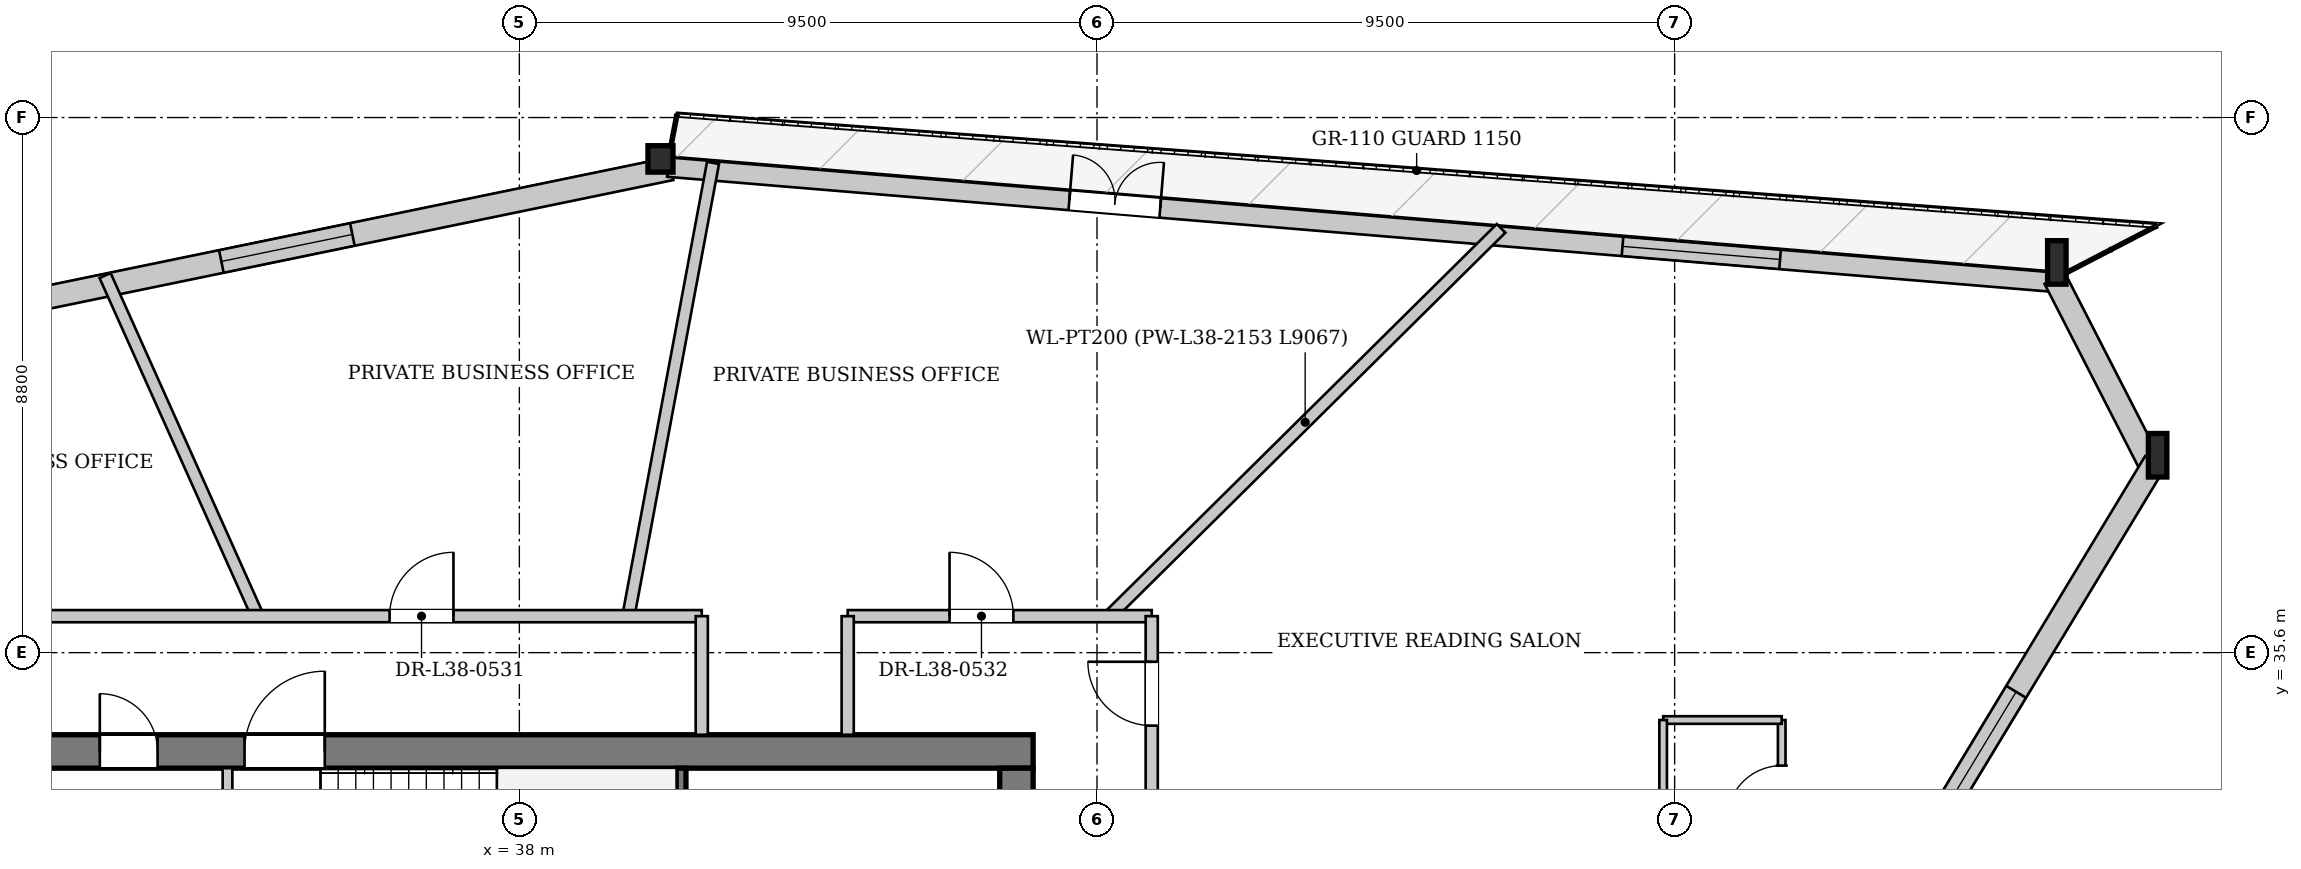
"""IFC4 building model, lengths in metres.
Left out: names, types, materials, properties, quantities, classifications, styles, units other than length and angle.
Written with IfcOpenShell. Run it as: python <this file> out.ifc"""

import sys

from ifc_helpers import new_model, si_unit, direction, frame, frame_2d, origin, origin_2d, place, context, subcontext, project, spatial, rectangle, i_section, extrude, source, transform, mapped, element, fill, save


model = new_model("IFC4")
c1 = context("Model", 3, precision=1e-05, world=origin(), true_north=direction((0.0, 1.0)))
c2 = subcontext(c1, "Body", "Model", "MODEL_VIEW")
j1 = project(units=[si_unit("LENGTHUNIT", "METRE"), si_unit("PLANEANGLEUNIT", "RADIAN")], contexts=[c1])
p1 = place(None, origin())
s1 = spatial("IfcSite", under=j1, at=p1, CompositionType="ELEMENT")
p2 = place(p1, origin())
s2 = spatial("IfcBuilding", under=s1, at=p2, CompositionType="ELEMENT")
p3 = place(p2, frame((0.0, 0.0, 146.6)))
s3 = spatial("IfcBuildingStorey", under=s2, at=p3, CompositionType="ELEMENT", Elevation=146.6)
m1 = source(origin(), c2, "Body", "SweptSolid", [
    extrude(i_section(OverallWidth=0.304, OverallDepth=0.716, WebThickness=0.021, FlangeThickness=0.04, at=origin_2d()), origin(), (0.0, 0.0, 1.0), 3.419),
])
p4 = place(p3, frame((65.063, 38.637, 0.0), z_axis=(-0.070258016221, 0.122594526272, 0.989966864741), x_axis=(-0.867620537636, -0.497226912658, 0.0)))
e1 = element("IfcColumn", 1, at=p4, inside=s3, PredefinedType="COLUMN", context=c2, shape_type="MappedRepresentation", body=[
    mapped(m1, transform((0.0, 0.0, 0.0), x_axis=(1.0, 0.0, 0.0), y_axis=(0.0, 1.0, 0.0), z_axis=(0.0, 0.0, 1.0), scale=1.0)),
])
m2 = source(origin(), c2, "Body", "SweptSolid", [
    extrude(i_section(OverallWidth=0.304, OverallDepth=0.716, WebThickness=0.021, FlangeThickness=0.04, at=origin_2d()), origin(), (0.0, 0.0, 1.0), 3.415),
])
p5 = place(p3, frame((63.422, 41.837, 0.0), z_axis=(-0.079785459835, 0.105236735552, 0.991241398394), x_axis=(-0.796871005575, -0.604149485205, 0.0)))
e2 = element("IfcColumn", 2, at=p5, inside=s3, PredefinedType="COLUMN", context=c2, shape_type="MappedRepresentation", body=[
    mapped(m2, transform((0.0, 0.0, 0.0), x_axis=(1.0, 0.0, 0.0), y_axis=(0.0, 1.0, 0.0), z_axis=(0.0, 0.0, 1.0), scale=1.0)),
])
m3 = source(origin(), c2, "Body", "SweptSolid", [
    extrude(i_section(OverallWidth=0.412, OverallDepth=0.435, WebThickness=0.031, FlangeThickness=0.05, at=origin_2d()), origin(), (0.0, 0.0, 1.0), 3.396),
])
p6 = place(p3, frame((40.457, 43.744, 0.0), z_axis=(-0.080079410056, -0.01473633668, 0.996679551544), x_axis=(0.180982664864, -0.983486286137, 0.0)))
e3 = element("IfcColumn", 3, at=p6, inside=s3, PredefinedType="COLUMN", context=c2, shape_type="MappedRepresentation", body=[
    mapped(m3, transform((0.0, 0.0, 0.0), x_axis=(1.0, 0.0, 0.0), y_axis=(0.0, 1.0, 0.0), z_axis=(0.0, 0.0, 1.0), scale=1.0)),
])
p7 = place(p3, frame((17.926, 38.903, 0.0), z_axis=(0.0, 0.0, 1.0), x_axis=(0.979384542026, 0.202004749552, 0.0)))
e4 = element("IfcWall", 4, at=p7, inside=s3, PredefinedType="SOLIDWALL", context=c2, shape_type="SweptSolid", body=[
    extrude(rectangle(XDim=23.044, YDim=0.38, at=frame_2d((11.522, 0.0))), origin(), (0.0, 0.0, 1.0), 2.692),
])
p8 = place(p7, frame((5.352, 0.0, 0.322)))
e5 = element("IfcOpeningElement", 5, at=p8, cuts=e4, PredefinedType="OPENING", context=c2, shape_type="SweptSolid", body=[
    extrude(rectangle(XDim=2.2, YDim=2.25, at=frame_2d((1.1, 1.125))), frame((0.0, 0.2, 0.0), z_axis=(0.0, -1.0, 0.0), x_axis=(1.0, 0.0, 0.0)), (0.0, 0.0, 1.0), 0.4),
])
p9 = place(p7, frame((15.492, 0.0, 0.322)))
e6 = element("IfcOpeningElement", 6, at=p9, cuts=e4, PredefinedType="OPENING", context=c2, shape_type="SweptSolid", body=[
    extrude(rectangle(XDim=2.2, YDim=2.25, at=frame_2d((1.1, 1.125))), frame((0.0, 0.2, 0.0), z_axis=(0.0, -1.0, 0.0), x_axis=(1.0, 0.0, 0.0)), (0.0, 0.0, 1.0), 0.4),
])
p10 = place(p3, frame((40.444, 43.585, 0.0), z_axis=(0.0, 0.0, 1.0), x_axis=(0.996570046252, -0.08275350695, 0.0)))
e7 = element("IfcWall", 7, at=p10, inside=s3, PredefinedType="SOLIDWALL", context=c2, shape_type="SweptSolid", body=[
    extrude(rectangle(XDim=23.044, YDim=0.32, at=frame_2d((11.522, 0.0))), origin(), (0.0, 0.0, 1.0), 2.692),
])
p11 = place(p10, frame((6.624, 0.0, 0.0)))
e8 = element("IfcOpeningElement", 8, at=p11, cuts=e7, PredefinedType="OPENING", context=c2, shape_type="SweptSolid", body=[
    extrude(rectangle(XDim=1.5, YDim=2.3, at=frame_2d((0.75, 1.15))), frame((0.0, 0.17, 0.0), z_axis=(0.0, -1.0, 0.0), x_axis=(1.0, 0.0, 0.0)), (0.0, 0.0, 1.0), 0.34),
])
p12 = place(p10, frame((15.753, 0.0, 0.25)))
e9 = element("IfcOpeningElement", 9, at=p12, cuts=e7, PredefinedType="OPENING", context=c2, shape_type="SweptSolid", body=[
    extrude(rectangle(XDim=2.6, YDim=2.35, at=frame_2d((1.3, 1.175))), frame((0.0, 0.17, 0.0), z_axis=(0.0, -1.0, 0.0), x_axis=(1.0, 0.0, 0.0)), (0.0, 0.0, 1.0), 0.34),
])
p13 = place(p3, frame((63.253, 41.751, 0.0), z_axis=(0.0, 0.0, 1.0), x_axis=(0.456338692797, -0.889806157237, 0.0)))
e10 = element("IfcWall", 10, at=p13, inside=s3, PredefinedType="SOLIDWALL", context=c2, shape_type="SweptSolid", body=[
    extrude(rectangle(XDim=3.597, YDim=0.38, at=frame_2d((1.799, 0.0))), origin(), (0.0, 0.0, 1.0), 2.692),
])
p14 = place(p3, frame((64.901, 38.735, 0.0), z_axis=(0.0, 0.0, 1.0), x_axis=(-0.517346318523, -0.855776131188, 0.0)))
e11 = element("IfcWall", 11, at=p14, inside=s3, PredefinedType="SOLIDWALL", context=c2, shape_type="SweptSolid", body=[
    extrude(rectangle(XDim=23.63, YDim=0.38, at=frame_2d((11.815, 0.0))), origin(), (0.0, 0.0, 1.0), 2.692),
])
p15 = place(p14, frame((4.416, 0.0, 0.322)))
e12 = element("IfcOpeningElement", 12, at=p15, cuts=e11, PredefinedType="OPENING", context=c2, shape_type="SweptSolid", body=[
    extrude(rectangle(XDim=2.2, YDim=2.25, at=frame_2d((1.1, 1.125))), frame((0.0, 0.2, 0.0), z_axis=(0.0, -1.0, 0.0), x_axis=(1.0, 0.0, 0.0)), (0.0, 0.0, 1.0), 0.4),
])
p16 = place(p14, frame((15.914, 0.0, 0.322)))
e13 = element("IfcOpeningElement", 13, at=p16, cuts=e11, PredefinedType="OPENING", context=c2, shape_type="SweptSolid", body=[
    extrude(rectangle(XDim=2.2, YDim=2.25, at=frame_2d((1.1, 1.125))), frame((0.0, 0.2, 0.0), z_axis=(0.0, -1.0, 0.0), x_axis=(1.0, 0.0, 0.0)), (0.0, 0.0, 1.0), 0.4),
])
p17 = place(p3, frame((29.55, 33.975, 0.0), z_axis=(0.0, 0.0, 1.0), x_axis=(1.0, 0.0, 0.0)))
e14 = element("IfcWall", 14, at=p17, inside=s3, PredefinedType="SHEAR", context=c2, shape_type="SweptSolid", body=[
    extrude(rectangle(XDim=16.9, YDim=0.55, at=frame_2d((8.45, 0.0))), origin(), (0.0, 0.0, 1.0), 3.3),
])
p18 = place(p17, frame((1.55, 0.0, 0.0)))
e15 = element("IfcOpeningElement", 15, at=p18, cuts=e14, PredefinedType="OPENING", context=c2, shape_type="SweptSolid", body=[
    extrude(rectangle(XDim=0.95, YDim=2.1, at=frame_2d((0.475, 1.05))), frame((0.0, 0.285, 0.0), z_axis=(0.0, -1.0, 0.0), x_axis=(1.0, 0.0, 0.0)), (0.0, 0.0, 1.0), 0.57),
])
p19 = place(p17, frame((3.93, 0.0, 0.0)))
e16 = element("IfcOpeningElement", 16, at=p19, cuts=e14, PredefinedType="OPENING", context=c2, shape_type="SweptSolid", body=[
    extrude(rectangle(XDim=1.32, YDim=2.2, at=frame_2d((0.66, 1.1))), frame((0.0, 0.285, 0.0), z_axis=(0.0, -1.0, 0.0), x_axis=(1.0, 0.0, 0.0)), (0.0, 0.0, 1.0), 0.57),
])
p20 = place(p3, frame((46.175, 33.7, 0.0), z_axis=(0.0, 0.0, 1.0), x_axis=(0.0, -1.0, 0.0)))
e17 = element("IfcWall", 17, at=p20, inside=s3, PredefinedType="SHEAR", context=c2, shape_type="SweptSolid", body=[
    extrude(rectangle(XDim=14.2, YDim=0.55, at=frame_2d((7.1, 0.0))), origin(), (0.0, 0.0, 1.0), 3.3),
])
p21 = place(p20, frame((5.18, 0.0, 0.0)))
e18 = element("IfcOpeningElement", 18, at=p21, cuts=e17, PredefinedType="OPENING", context=c2, shape_type="SweptSolid", body=[
    extrude(rectangle(XDim=1.6, YDim=2.2, at=frame_2d((0.8, 1.1))), frame((0.0, 0.285, 0.0), z_axis=(0.0, -1.0, 0.0), x_axis=(1.0, 0.0, 0.0)), (0.0, 0.0, 1.0), 0.57),
])
p22 = place(p20, frame((2.05, 0.0, 0.0)))
e19 = element("IfcOpeningElement", 19, at=p22, cuts=e17, PredefinedType="OPENING", context=c2, shape_type="SweptSolid", body=[
    extrude(rectangle(XDim=0.95, YDim=2.1, at=frame_2d((0.475, 1.05))), frame((0.0, 0.285, 0.0), z_axis=(0.0, -1.0, 0.0), x_axis=(1.0, 0.0, 0.0)), (0.0, 0.0, 1.0), 0.57),
])
p23 = place(p3, frame((40.66, 30.6, 0.0), z_axis=(0.0, 0.0, 1.0), x_axis=(0.0, 1.0, 0.0)))
e20 = element("IfcWall", 20, at=p23, inside=s3, PredefinedType="PARTITIONING", context=c2, shape_type="SweptSolid", body=[
    extrude(rectangle(XDim=3.1, YDim=0.16, at=frame_2d((1.55, 0.0))), origin(), (0.0, 0.0, 1.0), 3.3),
])
p24 = place(p3, frame((33.2, 28.44, 0.0), z_axis=(0.0, 0.0, 1.0), x_axis=(0.0, 1.0, 0.0)))
e21 = element("IfcWall", 21, at=p24, inside=s3, PredefinedType="PARTITIONING", context=c2, shape_type="SweptSolid", body=[
    extrude(rectangle(XDim=5.26, YDim=0.16, at=frame_2d((2.63, 0.0))), origin(), (0.0, 0.0, 1.0), 3.3),
])
p25 = place(p3, frame((47.701, 36.2, 0.0), z_axis=(0.0, 0.0, 1.0), x_axis=(0.710799449418, 0.703394727523, 0.0)))
e22 = element("IfcWall", 22, at=p25, inside=s3, PredefinedType="PARTITIONING", context=c2, shape_type="SweptSolid", body=[
    extrude(rectangle(XDim=9.067, YDim=0.2, at=frame_2d((4.533, 0.0))), origin(), (0.0, 0.0, 1.0), 3.3),
])
p26 = place(p3, frame((39.793, 36.2, 0.0), z_axis=(0.0, 0.0, 1.0), x_axis=(0.183586717178, 0.983003518445, 0.0)))
e23 = element("IfcWall", 23, at=p26, inside=s3, PredefinedType="PARTITIONING", context=c2, shape_type="SweptSolid", body=[
    extrude(rectangle(XDim=7.583, YDim=0.2, at=frame_2d((3.792, 0.0))), origin(), (0.0, 0.0, 1.0), 3.3),
])
p27 = place(p3, frame((33.697, 36.2, 0.0), z_axis=(0.0, 0.0, 1.0), x_axis=(-0.408999948969, 0.912534405786, 0.0)))
e24 = element("IfcWall", 24, at=p27, inside=s3, PredefinedType="PARTITIONING", context=c2, shape_type="SweptSolid", body=[
    extrude(rectangle(XDim=6.139, YDim=0.2, at=frame_2d((3.069, 0.0))), origin(), (0.0, 0.0, 1.0), 3.3),
])
p28 = place(p3, frame((58.761, 32.092, 0.0), z_axis=(0.0, 0.0, 1.0), x_axis=(0.0, 1.0, 0.0)))
e25 = element("IfcWall", 25, at=p28, inside=s3, PredefinedType="PARTITIONING", context=c2, shape_type="SweptSolid", body=[
    extrude(rectangle(XDim=2.4, YDim=0.125, at=frame_2d((1.2, 0.0))), origin(), (0.0, 0.0, 1.0), 3.3),
])
p29 = place(p28, frame((0.75, 0.0, 0.0)))
e26 = element("IfcOpeningElement", 26, at=p29, cuts=e25, PredefinedType="OPENING", context=c2, shape_type="SweptSolid", body=[
    extrude(rectangle(XDim=0.9, YDim=2.1, at=frame_2d((0.45, 1.05))), frame((0.0, 0.073, 0.0), z_axis=(0.0, -1.0, 0.0), x_axis=(1.0, 0.0, 0.0)), (0.0, 0.0, 1.0), 0.145),
])
p30 = place(p3, frame((58.761, 34.492, 0.0), z_axis=(0.0, 0.0, 1.0), x_axis=(-1.0, 0.0, 0.0)))
e27 = element("IfcWall", 27, at=p30, inside=s3, PredefinedType="PARTITIONING", context=c2, shape_type="SweptSolid", body=[
    extrude(rectangle(XDim=1.95, YDim=0.125, at=frame_2d((0.975, 0.0))), origin(), (0.0, 0.0, 1.0), 3.3),
])
p31 = place(p3, frame((56.811, 34.492, 0.0), z_axis=(0.0, 0.0, 1.0), x_axis=(0.0, -1.0, 0.0)))
e28 = element("IfcWall", 28, at=p31, inside=s3, PredefinedType="PARTITIONING", context=c2, shape_type="SweptSolid", body=[
    extrude(rectangle(XDim=2.4, YDim=0.125, at=frame_2d((1.2, 0.0))), origin(), (0.0, 0.0, 1.0), 3.3),
])
p32 = place(p3, frame((27.6, 36.2, 0.0), z_axis=(0.0, 0.0, 1.0), x_axis=(1.0, 0.0, 0.0)))
e29 = element("IfcWall", 29, at=p32, inside=s3, PredefinedType="PARTITIONING", context=c2, shape_type="SweptSolid", body=[
    extrude(rectangle(XDim=13.4, YDim=0.2, at=frame_2d((6.7, 0.0))), origin(), (0.0, 0.0, 1.0), 3.3),
])
p33 = place(p32, frame((8.266, 0.0, 0.0)))
e30 = element("IfcOpeningElement", 30, at=p33, cuts=e29, PredefinedType="OPENING", context=c2, shape_type="SweptSolid", body=[
    extrude(rectangle(XDim=1.05, YDim=2.2, at=frame_2d((0.525, 1.1))), frame((0.0, 0.11, 0.0), z_axis=(0.0, -1.0, 0.0), x_axis=(1.0, 0.0, 0.0)), (0.0, 0.0, 1.0), 0.22),
])
p34 = place(p3, frame((41.0, 34.25, 0.0), z_axis=(0.0, 0.0, 1.0), x_axis=(0.0, 1.0, 0.0)))
e31 = element("IfcWall", 31, at=p34, inside=s3, PredefinedType="PARTITIONING", context=c2, shape_type="SweptSolid", body=[
    extrude(rectangle(XDim=1.95, YDim=0.2, at=frame_2d((0.975, 0.0))), origin(), (0.0, 0.0, 1.0), 3.3),
])
p35 = place(p3, frame((43.4, 36.2, 0.0), z_axis=(0.0, 0.0, 1.0), x_axis=(1.0, 0.0, 0.0)))
e32 = element("IfcWall", 32, at=p35, inside=s3, PredefinedType="PARTITIONING", context=c2, shape_type="SweptSolid", body=[
    extrude(rectangle(XDim=5.0, YDim=0.2, at=frame_2d((2.5, 0.0))), origin(), (0.0, 0.0, 1.0), 3.3),
])
p36 = place(p35, frame((1.675, 0.0, 0.0)))
e33 = element("IfcOpeningElement", 33, at=p36, cuts=e32, PredefinedType="OPENING", context=c2, shape_type="SweptSolid", body=[
    extrude(rectangle(XDim=1.05, YDim=2.2, at=frame_2d((0.525, 1.1))), frame((0.0, 0.11, 0.0), z_axis=(0.0, -1.0, 0.0), x_axis=(1.0, 0.0, 0.0)), (0.0, 0.0, 1.0), 0.22),
])
p37 = place(p3, frame((43.4, 34.25, 0.0), z_axis=(0.0, 0.0, 1.0), x_axis=(0.0, 1.0, 0.0)))
e34 = element("IfcWall", 34, at=p37, inside=s3, PredefinedType="PARTITIONING", context=c2, shape_type="SweptSolid", body=[
    extrude(rectangle(XDim=1.95, YDim=0.2, at=frame_2d((0.975, 0.0))), origin(), (0.0, 0.0, 1.0), 3.3),
])
p38 = place(p3, frame((48.4, 17.0, 0.0), z_axis=(0.0, 0.0, 1.0), x_axis=(0.0, 1.0, 0.0)))
e35 = element("IfcWall", 35, at=p38, inside=s3, PredefinedType="PARTITIONING", context=c2, shape_type="SweptSolid", body=[
    extrude(rectangle(XDim=19.2, YDim=0.2, at=frame_2d((9.6, 0.0))), origin(), (0.0, 0.0, 1.0), 3.3),
])
p39 = place(p38, frame((6.726, 0.0, 0.0)))
e36 = element("IfcOpeningElement", 36, at=p39, cuts=e35, PredefinedType="OPENING", context=c2, shape_type="SweptSolid", body=[
    extrude(rectangle(XDim=1.05, YDim=2.2, at=frame_2d((0.525, 1.1))), frame((0.0, 0.11, 0.0), z_axis=(0.0, -1.0, 0.0), x_axis=(1.0, 0.0, 0.0)), (0.0, 0.0, 1.0), 0.22),
])
p40 = place(p38, frame((17.4, 0.0, 0.0)))
e37 = element("IfcOpeningElement", 37, at=p40, cuts=e35, PredefinedType="OPENING", context=c2, shape_type="SweptSolid", body=[
    extrude(rectangle(XDim=1.05, YDim=2.2, at=frame_2d((0.525, 1.1))), frame((0.0, 0.11, 0.0), z_axis=(0.0, -1.0, 0.0), x_axis=(1.0, 0.0, 0.0)), (0.0, 0.0, 1.0), 0.22),
])
m4 = source(origin(), c2, "Body", "SweptSolid", [
    extrude(rectangle(XDim=2.2, YDim=2.25, at=frame_2d((1.1, 1.125))), frame((0.0, 0.03, 0.0), z_axis=(0.0, -1.0, 0.0), x_axis=(1.0, 0.0, 0.0)), (0.0, 0.0, 1.0), 0.06),
])
p41 = place(p9, origin())
e38 = element("IfcWindow", 38, at=p41, inside=s3, PartitioningType="SINGLE_PANEL", PredefinedType="WINDOW", context=c2, shape_type="MappedRepresentation", body=[
    mapped(m4, transform((0.0, 0.0, 0.0), x_axis=(1.0, 0.0, 0.0), y_axis=(0.0, 1.0, 0.0), z_axis=(0.0, 0.0, 1.0), scale=1.0)),
])
fill(e6, e38)
m5 = source(origin(), c2, "Body", "SweptSolid", [
    extrude(rectangle(XDim=1.5, YDim=2.3, at=frame_2d((0.75, 1.15))), frame((0.0, 0.025, 0.0), z_axis=(0.0, -1.0, 0.0), x_axis=(1.0, 0.0, 0.0)), (0.0, 0.0, 1.0), 0.05),
])
p42 = place(p11, origin())
e39 = element("IfcDoor", 39, at=p42, inside=s3, OperationType="DOUBLE_DOOR_SINGLE_SWING", PredefinedType="DOOR", context=c2, shape_type="MappedRepresentation", body=[
    mapped(m5, transform((0.0, 0.0, 0.0), x_axis=(1.0, 0.0, 0.0), y_axis=(0.0, 1.0, 0.0), z_axis=(0.0, 0.0, 1.0), scale=1.0)),
])
fill(e8, e39)
m6 = source(origin(), c2, "Body", "SweptSolid", [
    extrude(rectangle(XDim=2.6, YDim=2.35, at=frame_2d((1.3, 1.175))), frame((0.0, 0.03, 0.0), z_axis=(0.0, -1.0, 0.0), x_axis=(1.0, 0.0, 0.0)), (0.0, 0.0, 1.0), 0.06),
])
p43 = place(p12, origin())
e40 = element("IfcWindow", 40, at=p43, inside=s3, PartitioningType="SINGLE_PANEL", PredefinedType="WINDOW", context=c2, shape_type="MappedRepresentation", body=[
    mapped(m6, transform((0.0, 0.0, 0.0), x_axis=(1.0, 0.0, 0.0), y_axis=(0.0, 1.0, 0.0), z_axis=(0.0, 0.0, 1.0), scale=1.0)),
])
fill(e9, e40)
p44 = place(p15, origin())
e41 = element("IfcWindow", 41, at=p44, inside=s3, PartitioningType="SINGLE_PANEL", PredefinedType="WINDOW", context=c2, shape_type="MappedRepresentation", body=[
    mapped(m4, transform((0.0, 0.0, 0.0), x_axis=(1.0, 0.0, 0.0), y_axis=(0.0, 1.0, 0.0), z_axis=(0.0, 0.0, 1.0), scale=1.0)),
])
fill(e12, e41)
m7 = source(origin(), c2, "Body", "SweptSolid", [
    extrude(rectangle(XDim=0.95, YDim=2.1, at=frame_2d((0.475, 1.05))), frame((0.0, 0.025, 0.0), z_axis=(0.0, -1.0, 0.0), x_axis=(1.0, 0.0, 0.0)), (0.0, 0.0, 1.0), 0.05),
])
p45 = place(p18, origin())
e42 = element("IfcDoor", 42, at=p45, inside=s3, OperationType="SINGLE_SWING_LEFT", PredefinedType="DOOR", context=c2, shape_type="MappedRepresentation", body=[
    mapped(m7, transform((0.0, 0.0, 0.0), x_axis=(1.0, 0.0, 0.0), y_axis=(0.0, 1.0, 0.0), z_axis=(0.0, 0.0, 1.0), scale=1.0)),
])
fill(e15, e42)
m8 = source(origin(), c2, "Body", "SweptSolid", [
    extrude(rectangle(XDim=1.32, YDim=2.2, at=frame_2d((0.66, 1.1))), frame((0.0, 0.025, 0.0), z_axis=(0.0, -1.0, 0.0), x_axis=(1.0, 0.0, 0.0)), (0.0, 0.0, 1.0), 0.05),
])
p46 = place(p19, origin())
e43 = element("IfcDoor", 43, at=p46, inside=s3, OperationType="SINGLE_SWING_RIGHT", PredefinedType="DOOR", context=c2, shape_type="MappedRepresentation", body=[
    mapped(m8, transform((0.0, 0.0, 0.0), x_axis=(1.0, 0.0, 0.0), y_axis=(0.0, 1.0, 0.0), z_axis=(0.0, 0.0, 1.0), scale=1.0)),
])
fill(e16, e43)
m9 = source(origin(), c2, "Body", "SweptSolid", [
    extrude(rectangle(XDim=0.9, YDim=2.1, at=frame_2d((0.45, 1.05))), frame((0.0, 0.025, 0.0), z_axis=(0.0, -1.0, 0.0), x_axis=(1.0, 0.0, 0.0)), (0.0, 0.0, 1.0), 0.05),
])
p47 = place(p29, origin())
e44 = element("IfcDoor", 44, at=p47, inside=s3, OperationType="SINGLE_SWING_LEFT", PredefinedType="DOOR", context=c2, shape_type="MappedRepresentation", body=[
    mapped(m9, transform((0.0, 0.0, 0.0), x_axis=(1.0, 0.0, 0.0), y_axis=(0.0, 1.0, 0.0), z_axis=(0.0, 0.0, 1.0), scale=1.0)),
])
fill(e26, e44)
m10 = source(origin(), c2, "Body", "SweptSolid", [
    extrude(rectangle(XDim=1.05, YDim=2.2, at=frame_2d((0.525, 1.1))), frame((0.0, 0.025, 0.0), z_axis=(0.0, -1.0, 0.0), x_axis=(1.0, 0.0, 0.0)), (0.0, 0.0, 1.0), 0.05),
])
p48 = place(p33, origin())
e45 = element("IfcDoor", 45, at=p48, inside=s3, OperationType="SINGLE_SWING_RIGHT", PredefinedType="DOOR", context=c2, shape_type="MappedRepresentation", body=[
    mapped(m10, transform((0.0, 0.0, 0.0), x_axis=(1.0, 0.0, 0.0), y_axis=(0.0, 1.0, 0.0), z_axis=(0.0, 0.0, 1.0), scale=1.0)),
])
fill(e30, e45)
p49 = place(p36, origin())
e46 = element("IfcDoor", 46, at=p49, inside=s3, OperationType="SINGLE_SWING_LEFT", PredefinedType="DOOR", context=c2, shape_type="MappedRepresentation", body=[
    mapped(m10, transform((0.0, 0.0, 0.0), x_axis=(1.0, 0.0, 0.0), y_axis=(0.0, 1.0, 0.0), z_axis=(0.0, 0.0, 1.0), scale=1.0)),
])
fill(e33, e46)
p50 = place(p40, origin())
e47 = element("IfcDoor", 47, at=p50, inside=s3, OperationType="SINGLE_SWING_RIGHT", PredefinedType="DOOR", context=c2, shape_type="MappedRepresentation", body=[
    mapped(m10, transform((0.0, 0.0, 0.0), x_axis=(1.0, 0.0, 0.0), y_axis=(0.0, 1.0, 0.0), z_axis=(0.0, 0.0, 1.0), scale=1.0)),
])
fill(e37, e47)
save(model, sys.argv[1])
